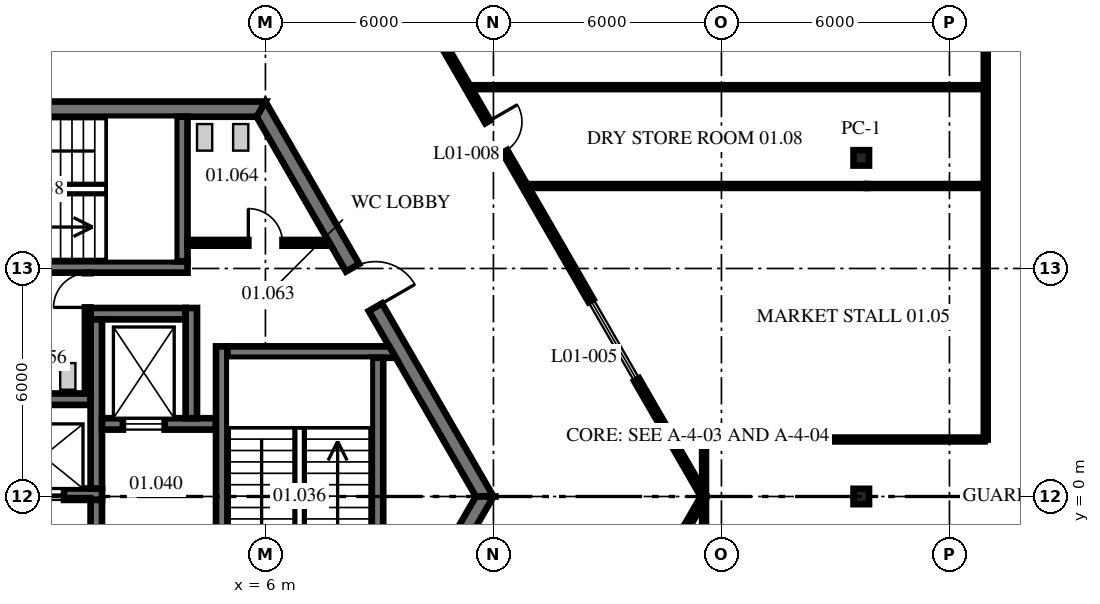
"""IFC4 building model, lengths in metres.
Left out: names, types, materials, properties, quantities, classifications, styles, units other than length and angle.
Written with IfcOpenShell. Run it as: python <this file> out.ifc"""

import sys

from ifc_helpers import new_model, si_unit, direction, frame, frame_2d, origin, origin_2d, place, context, subcontext, project, spatial, polyline, rectangle, i_section, outline, extrude, source, transform, mapped, element, fill, save


model = new_model("IFC4")
c1 = context("Model", 3, precision=1e-05, world=origin(), true_north=direction((0.0, 1.0)))
c2 = subcontext(c1, "Body", "Model", "MODEL_VIEW")
j1 = project(units=[si_unit("LENGTHUNIT", "METRE"), si_unit("PLANEANGLEUNIT", "RADIAN")], contexts=[c1])
p1 = place(None, origin())
s1 = spatial("IfcSite", under=j1, at=p1, CompositionType="ELEMENT")
p2 = place(p1, origin())
s2 = spatial("IfcBuilding", under=s1, at=p2, CompositionType="ELEMENT")
p3 = place(p2, frame((0.0, 0.0, 7.0)))
s3 = spatial("IfcBuildingStorey", under=s2, at=p3, CompositionType="ELEMENT", Elevation=7.0)
m1 = source(origin(), c2, "Body", "SweptSolid", [
    extrude(i_section(OverallWidth=0.404, OverallDepth=0.406, WebThickness=0.027, FlangeThickness=0.044, at=origin_2d()), origin(), (0.0, 0.0, 1.0), 4.5),
])
for number, where, z_axis, x_axis in (
    (1, (21.679, 0.0, 0.0), (0.0, 0.0, 1.0), (0.0, 1.0, 0.0)),
    (2, (21.679, 8.91, 0.0), (0.0, 0.0, 1.0), (0.0, 1.0, 0.0)),
):
    element("IfcColumn", number, at=place(p3, frame(where, z_axis=z_axis, x_axis=x_axis)), inside=s3, PredefinedType="COLUMN", context=c2, shape_type="MappedRepresentation", body=[
        mapped(m1, transform((0.0, 0.0, 0.0), scale=1.0)),
    ])
m2 = source(origin(), c2, "Body", "SweptSolid", [
    extrude(outline(polyline([(-0.115, -0.2), (11.885, -0.2), (11.654, 0.2), (0.115, 0.2), (-0.115, -0.2)])), origin(), (0.0, 0.0, 1.0), 4.3),
])
p4 = place(p3, frame((11.769, 0.0, 0.0), z_axis=(0.0, 0.0, 1.0), x_axis=(-0.499996592174, 0.866027371285, 0.0)))
e3 = element("IfcWall", 3, at=p4, inside=s3, PredefinedType="SHEAR", context=c2, shape_type="MappedRepresentation", body=[
    mapped(m2, transform((0.0, 0.0, 0.0), scale=1.0)),
])
p5 = place(p4, frame((5.75, 0.0, 0.0)))
e4 = element("IfcOpeningElement", 4, at=p5, cuts=e3, PredefinedType="OPENING", context=c2, shape_type="SweptSolid", body=[
    extrude(rectangle(XDim=1.2, YDim=2.1, at=frame_2d((0.6, 1.05))), frame((0.0, 0.21, 0.0), z_axis=(0.0, -1.0, 0.0), x_axis=(1.0, 0.0, 0.0)), (0.0, 0.0, 1.0), 0.42),
])
p6 = place(p3, frame((5.885, 10.192, 0.0), z_axis=(0.0, 0.0, 1.0), x_axis=(-1.0, 0.0, 0.0)))
e5 = element("IfcWall", 5, at=p6, inside=s3, PredefinedType="SHEAR", context=c2, shape_type="MappedRepresentation", body=[
    mapped(m2, transform((0.0, 0.0, 0.0), scale=1.0)),
])
p7 = place(p6, frame((7.985, 0.0, 0.0)))
e6 = element("IfcOpeningElement", 6, at=p7, cuts=e5, PredefinedType="OPENING", context=c2, shape_type="SweptSolid", body=[
    extrude(rectangle(XDim=1.2, YDim=2.1, at=frame_2d((0.6, 1.05))), frame((0.0, 0.21, 0.0), z_axis=(0.0, -1.0, 0.0), x_axis=(1.0, 0.0, 0.0)), (0.0, 0.0, 1.0), 0.42),
])
p8 = place(p3, frame((5.885, -10.192, 0.0), z_axis=(0.0, 0.0, 1.0), x_axis=(0.499996592174, 0.866027371285, 0.0)))
e7 = element("IfcWall", 7, at=p8, inside=s3, PredefinedType="SHEAR", context=c2, shape_type="MappedRepresentation", body=[
    mapped(m2, transform((0.0, 0.0, 0.0), scale=1.0)),
])
p9 = place(p8, frame((3.665, 0.0, 0.0)))
e8 = element("IfcOpeningElement", 8, at=p9, cuts=e7, PredefinedType="OPENING", context=c2, shape_type="SweptSolid", body=[
    extrude(rectangle(XDim=1.2, YDim=2.1, at=frame_2d((0.6, 1.05))), frame((0.0, 0.21, 0.0), z_axis=(0.0, -1.0, 0.0), x_axis=(1.0, 0.0, 0.0)), (0.0, 0.0, 1.0), 0.42),
])
m3 = source(origin(), c2, "Body", "SweptSolid", [
    extrude(rectangle(XDim=11.5, YDim=0.3, at=frame_2d((5.75, 0.0))), origin(), (0.0, 0.0, 1.0), 4.3),
])
p10 = place(p3, frame((-9.8, 0.06, 0.0), z_axis=(0.0, 0.0, 1.0), x_axis=(1.0, 0.0, 0.0)))
e9 = element("IfcWall", 9, at=p10, inside=s3, PredefinedType="SHEAR", context=c2, shape_type="MappedRepresentation", body=[
    mapped(m3, transform((0.0, 0.0, 0.0), scale=1.0)),
])
p11 = place(p10, frame((1.0, 0.0, 0.0)))
e10 = element("IfcOpeningElement", 10, at=p11, cuts=e9, PredefinedType="OPENING", context=c2, shape_type="SweptSolid", body=[
    extrude(rectangle(XDim=1.1, YDim=2.1, at=frame_2d((0.55, 1.05))), frame((0.0, 0.16, 0.0), z_axis=(0.0, -1.0, 0.0), x_axis=(1.0, 0.0, 0.0)), (0.0, 0.0, 1.0), 0.32),
])
p12 = place(p10, frame((3.8, 0.0, 0.0)))
e11 = element("IfcOpeningElement", 11, at=p12, cuts=e9, PredefinedType="OPENING", context=c2, shape_type="SweptSolid", body=[
    extrude(rectangle(XDim=1.1, YDim=2.1, at=frame_2d((0.55, 1.05))), frame((0.0, 0.16, 0.0), z_axis=(0.0, -1.0, 0.0), x_axis=(1.0, 0.0, 0.0)), (0.0, 0.0, 1.0), 0.32),
])
p13 = place(p10, frame((6.6, 0.0, 0.0)))
e12 = element("IfcOpeningElement", 12, at=p13, cuts=e9, PredefinedType="OPENING", context=c2, shape_type="SweptSolid", body=[
    extrude(rectangle(XDim=1.1, YDim=2.1, at=frame_2d((0.55, 1.05))), frame((0.0, 0.16, 0.0), z_axis=(0.0, -1.0, 0.0), x_axis=(1.0, 0.0, 0.0)), (0.0, 0.0, 1.0), 0.32),
])
p14 = place(p10, frame((9.4, 0.0, 0.0)))
e13 = element("IfcOpeningElement", 13, at=p14, cuts=e9, PredefinedType="OPENING", context=c2, shape_type="SweptSolid", body=[
    extrude(rectangle(XDim=1.1, YDim=2.1, at=frame_2d((0.55, 1.05))), frame((0.0, 0.16, 0.0), z_axis=(0.0, -1.0, 0.0), x_axis=(1.0, 0.0, 0.0)), (0.0, 0.0, 1.0), 0.32),
])
m4 = source(origin(), c2, "Body", "SweptSolid", [
    extrude(outline(polyline([(11.2, -0.15), (-0.349, -0.15), (-0.176, 0.15), (11.2, 0.15), (11.2, -0.15)])), origin(), (0.0, 0.0, 1.0), 4.3),
])
p15 = place(p3, frame((-9.8, 2.56, 0.0), z_axis=(0.0, 0.0, 1.0), x_axis=(1.0, 0.0, 0.0)))
e14 = element("IfcWall", 14, at=p15, inside=s3, PredefinedType="SHEAR", context=c2, shape_type="MappedRepresentation", body=[
    mapped(m4, transform((0.0, 0.0, 0.0), scale=1.0)),
])
m5 = source(origin(), c2, "Body", "SweptSolid", [
    extrude(rectangle(XDim=2.5, YDim=0.3, at=frame_2d((1.25, 0.0))), origin(), (0.0, 0.0, 1.0), 4.3),
])
p16 = place(p3, frame((1.4, 4.81, 0.0), z_axis=(0.0, 0.0, 1.0), x_axis=(1.0, 0.0, 0.0)))
e15 = element("IfcWall", 15, at=p16, inside=s3, PredefinedType="SHEAR", context=c2, shape_type="MappedRepresentation", body=[
    mapped(m5, transform((0.0, 0.0, 0.0), scale=1.0)),
])
m6 = source(origin(), c2, "Body", "SweptSolid", [
    extrude(rectangle(XDim=4.45, YDim=0.3, at=frame_2d((2.225, 0.0))), origin(), (0.0, 0.0, 1.0), 4.3),
])
p17 = place(p3, frame((1.55, 0.21, 0.0), z_axis=(0.0, 0.0, 1.0), x_axis=(0.0, 1.0, 0.0)))
e16 = element("IfcWall", 16, at=p17, inside=s3, PredefinedType="SHEAR", context=c2, shape_type="MappedRepresentation", body=[
    mapped(m6, transform((0.0, 0.0, 0.0), scale=1.0)),
])
m7 = source(origin(), c2, "Body", "SweptSolid", [
    extrude(rectangle(XDim=3.0, YDim=0.3, at=frame_2d((1.5, 0.0))), origin(), (0.0, 0.0, 1.0), 4.3),
])
p18 = place(p3, frame((1.7, 1.91, 0.0), z_axis=(0.0, 0.0, 1.0), x_axis=(1.0, 0.0, 0.0)))
e17 = element("IfcWall", 17, at=p18, inside=s3, PredefinedType="SHEAR", context=c2, shape_type="MappedRepresentation", body=[
    mapped(m7, transform((0.0, 0.0, 0.0), scale=1.0)),
])
p19 = place(p18, frame((0.55, 0.0, 0.0)))
e18 = element("IfcOpeningElement", 18, at=p19, cuts=e17, PredefinedType="OPENING", context=c2, shape_type="SweptSolid", body=[
    extrude(rectangle(XDim=1.1, YDim=2.1, at=frame_2d((0.55, 1.05))), frame((0.0, 0.16, 0.0), z_axis=(0.0, -1.0, 0.0), x_axis=(1.0, 0.0, 0.0)), (0.0, 0.0, 1.0), 0.32),
])
m8 = source(origin(), c2, "Body", "SweptSolid", [
    extrude(rectangle(XDim=2.9, YDim=0.3, at=frame_2d((1.45, 0.0))), origin(), (0.0, 0.0, 1.0), 4.3),
])
p20 = place(p3, frame((4.05, 2.06, 0.0), z_axis=(0.0, 0.0, 1.0), x_axis=(0.0, 1.0, 0.0)))
e19 = element("IfcWall", 19, at=p20, inside=s3, PredefinedType="SHEAR", context=c2, shape_type="MappedRepresentation", body=[
    mapped(m8, transform((0.0, 0.0, 0.0), scale=1.0)),
])
p21 = place(p3, frame((1.55, -3.09, 0.0), z_axis=(0.0, 0.0, 1.0), x_axis=(0.0, 1.0, 0.0)))
e20 = element("IfcWall", 20, at=p21, inside=s3, PredefinedType="SHEAR", context=c2, shape_type="MappedRepresentation", body=[
    mapped(m7, transform((0.0, 0.0, 0.0), scale=1.0)),
])
p22 = place(p21, frame((0.9, 0.0, 0.0)))
e21 = element("IfcOpeningElement", 21, at=p22, cuts=e20, PredefinedType="OPENING", context=c2, shape_type="SweptSolid", body=[
    extrude(rectangle(XDim=1.2, YDim=2.1, at=frame_2d((0.6, 1.05))), frame((0.0, 0.16, 0.0), z_axis=(0.0, -1.0, 0.0), x_axis=(1.0, 0.0, 0.0)), (0.0, 0.0, 1.0), 0.32),
])
m9 = source(origin(), c2, "Body", "SweptSolid", [
    extrude(outline(polyline([(-0.15, -0.15), (9.99, -0.15), (9.99, 0.15), (0.15, 0.15), (-0.15, -0.15)])), origin(), (0.0, 0.0, 1.0), 4.3),
])
p23 = place(p3, frame((4.85, -6.04, 0.0), z_axis=(0.0, 0.0, 1.0), x_axis=(0.0, 1.0, 0.0)))
e22 = element("IfcWall", 22, at=p23, inside=s3, PredefinedType="SHEAR", context=c2, shape_type="MappedRepresentation", body=[
    mapped(m9, transform((0.0, 0.0, 0.0), scale=1.0)),
])
p24 = place(p23, frame((3.19, 0.0, 0.0)))
e23 = element("IfcOpeningElement", 23, at=p24, cuts=e22, PredefinedType="OPENING", context=c2, shape_type="SweptSolid", body=[
    extrude(rectangle(XDim=1.1, YDim=2.1, at=frame_2d((0.55, 1.05))), frame((0.0, 0.16, 0.0), z_axis=(0.0, -1.0, 0.0), x_axis=(1.0, 0.0, 0.0)), (0.0, 0.0, 1.0), 0.32),
])
m10 = source(origin(), c2, "Body", "SweptSolid", [
    extrude(outline(polyline([(0.0, -0.15), (0.0, 0.15), (4.26, 0.15), (4.433, -0.15), (0.0, -0.15)])), origin(), (0.0, 0.0, 1.0), 4.3),
])
p25 = place(p3, frame((5.0, 3.8, 0.0), z_axis=(0.0, 0.0, 1.0), x_axis=(1.0, 0.0, 0.0)))
e24 = element("IfcWall", 24, at=p25, inside=s3, PredefinedType="SHEAR", context=c2, shape_type="MappedRepresentation", body=[
    mapped(m10, transform((0.0, 0.0, 0.0), scale=1.0)),
])
m11 = source(origin(), c2, "Body", "SweptSolid", [
    extrude(rectangle(XDim=7.3, YDim=0.3, at=frame_2d((3.65, 0.0))), origin(), (0.0, 0.0, 1.0), 4.3),
])
p26 = place(p3, frame((8.95, -3.65, 0.0), z_axis=(0.0, 0.0, 1.0), x_axis=(0.0, 1.0, 0.0)))
e25 = element("IfcWall", 25, at=p26, inside=s3, PredefinedType="SHEAR", context=c2, shape_type="MappedRepresentation", body=[
    mapped(m11, transform((0.0, 0.0, 0.0), scale=1.0)),
])
m12 = source(origin(), c2, "Body", "SweptSolid", [
    extrude(rectangle(XDim=7.9, YDim=0.3, at=frame_2d((3.95, 0.0))), origin(), (0.0, 0.0, 1.0), 4.3),
])
p27 = place(p3, frame((-3.95, 6.04, 0.0), z_axis=(0.0, 0.0, 1.0), x_axis=(1.0, 0.0, 0.0)))
e26 = element("IfcWall", 26, at=p27, inside=s3, PredefinedType="SHEAR", context=c2, shape_type="MappedRepresentation", body=[
    mapped(m12, transform((0.0, 0.0, 0.0), scale=1.0)),
])
m13 = source(origin(), c2, "Body", "SweptSolid", [
    extrude(outline(polyline([(0.0, -0.15), (0.0, 0.15), (3.804, 0.15), (3.804, -0.15), (0.0, -0.15)])), origin(), (0.0, 0.0, 1.0), 4.3),
])
p28 = place(p3, frame((3.8, 6.19, 0.0), z_axis=(0.0, 0.0, 1.0), x_axis=(0.0, 1.0, 0.0)))
e27 = element("IfcWall", 27, at=p28, inside=s3, PredefinedType="SHEAR", context=c2, shape_type="MappedRepresentation", body=[
    mapped(m13, transform((0.0, 0.0, 0.0), scale=1.0)),
])
m14 = source(origin(), c2, "Body", "SweptSolid", [
    extrude(rectangle(XDim=3.18, YDim=0.15, at=frame_2d((1.59, 0.0))), origin(), (0.0, 0.0, 1.0), 4.3),
])
p29 = place(p3, frame((1.325, 2.71, 0.0), z_axis=(0.0, 0.0, 1.0), x_axis=(0.0, 1.0, 0.0)))
e28 = element("IfcWall", 28, at=p29, inside=s3, PredefinedType="PARTITIONING", context=c2, shape_type="MappedRepresentation", body=[
    mapped(m14, transform((0.0, 0.0, 0.0), scale=1.0)),
])
p30 = place(p29, frame((2.265, 0.0, 0.0)))
e29 = element("IfcOpeningElement", 29, at=p30, cuts=e28, PredefinedType="OPENING", context=c2, shape_type="SweptSolid", body=[
    extrude(rectangle(XDim=0.9, YDim=2.1, at=frame_2d((0.45, 1.05))), frame((0.0, 0.085, 0.0), z_axis=(0.0, -1.0, 0.0), x_axis=(1.0, 0.0, 0.0)), (0.0, 0.0, 1.0), 0.17),
])
m15 = source(origin(), c2, "Body", "SweptSolid", [
    extrude(outline(polyline([(0.0, -0.075), (0.0, 0.075), (3.693, 0.075), (3.78, -0.075), (0.0, -0.075)])), origin(), (0.0, 0.0, 1.0), 4.3),
])
p31 = place(p3, frame((3.95, 6.675, 0.0), z_axis=(0.0, 0.0, 1.0), x_axis=(1.0, 0.0, 0.0)))
e30 = element("IfcWall", 30, at=p31, inside=s3, PredefinedType="PARTITIONING", context=c2, shape_type="MappedRepresentation", body=[
    mapped(m15, transform((0.0, 0.0, 0.0), scale=1.0)),
])
p32 = place(p31, frame((1.6, 0.0, 0.0)))
e31 = element("IfcOpeningElement", 31, at=p32, cuts=e30, PredefinedType="OPENING", context=c2, shape_type="SweptSolid", body=[
    extrude(rectangle(XDim=0.9, YDim=2.1, at=frame_2d((0.45, 1.05))), frame((0.0, 0.085, 0.0), z_axis=(0.0, -1.0, 0.0), x_axis=(1.0, 0.0, 0.0)), (0.0, 0.0, 1.0), 0.17),
])
p33 = place(p3, frame((8.792, 15.156, 0.0), z_axis=(0.0, 0.0, 1.0), x_axis=(0.499996830835, -0.866027233495, 0.0)))
e32 = element("IfcWall", 32, at=p33, inside=s3, PredefinedType="PARTITIONING", context=c2, shape_type="SweptSolid", body=[
    extrude(rectangle(XDim=17.458, YDim=0.15, at=frame_2d((8.729, 0.0))), origin(), (0.0, 0.0, 1.0), 4.3),
])
p34 = place(p33, frame((11.551, 0.0, 0.0)))
e33 = element("IfcOpeningElement", 33, at=p34, cuts=e32, PredefinedType="OPENING", context=c2, shape_type="SweptSolid", body=[
    extrude(rectangle(XDim=2.4, YDim=2.4, at=frame_2d((1.2, 1.2))), frame((0.0, 0.085, 0.0), z_axis=(0.0, -1.0, 0.0), x_axis=(1.0, 0.0, 0.0)), (0.0, 0.0, 1.0), 0.17),
])
p35 = place(p33, frame((2.014, 0.0, 0.0)))
e34 = element("IfcOpeningElement", 34, at=p35, cuts=e32, PredefinedType="OPENING", context=c2, shape_type="SweptSolid", body=[
    extrude(rectangle(XDim=0.9, YDim=2.1, at=frame_2d((0.45, 1.05))), frame((0.0, 0.085, 0.0), z_axis=(0.0, -1.0, 0.0), x_axis=(1.0, 0.0, 0.0)), (0.0, 0.0, 1.0), 0.17),
])
p36 = place(p33, frame((6.117, 0.0, 0.0)))
e35 = element("IfcOpeningElement", 35, at=p36, cuts=e32, PredefinedType="OPENING", context=c2, shape_type="SweptSolid", body=[
    extrude(rectangle(XDim=0.9, YDim=2.1, at=frame_2d((0.45, 1.05))), frame((0.0, 0.085, 0.0), z_axis=(0.0, -1.0, 0.0), x_axis=(1.0, 0.0, 0.0)), (0.0, 0.0, 1.0), 0.17),
])
p37 = place(p3, frame((17.542, 1.5, 0.0), z_axis=(0.0, 0.0, 1.0), x_axis=(1.0, 0.0, 0.0)))
e36 = element("IfcWall", 36, at=p37, inside=s3, PredefinedType="PARTITIONING", context=c2, shape_type="SweptSolid", body=[
    extrude(rectangle(XDim=7.382, YDim=0.1, at=frame_2d((3.691, 0.0))), origin(), (0.0, 0.0, 1.0), 4.3),
])
m16 = source(origin(), c2, "Body", "SweptSolid", [
    extrude(rectangle(XDim=8.919, YDim=0.1, at=frame_2d((4.459, 0.0))), origin(), (0.0, 0.0, 1.0), 4.3),
])
p38 = place(p3, frame((12.916, 8.17, 0.0), z_axis=(0.0, 0.0, 1.0), x_axis=(1.0, 0.0, 0.0)))
e37 = element("IfcWall", 37, at=p38, inside=s3, PredefinedType="PARTITIONING", context=c2, shape_type="MappedRepresentation", body=[
    mapped(m16, transform((0.0, 0.0, 0.0), scale=1.0)),
])
p39 = place(p3, frame((21.834, 8.17, 0.0), z_axis=(0.0, 0.0, 1.0), x_axis=(1.0, 0.0, 0.0)))
e38 = element("IfcWall", 38, at=p39, inside=s3, PredefinedType="PARTITIONING", context=c2, shape_type="SweptSolid", body=[
    extrude(rectangle(XDim=3.09, YDim=0.1, at=frame_2d((1.545, 0.0))), origin(), (0.0, 0.0, 1.0), 3.528),
])
p40 = place(p3, frame((11.415, 10.77, 0.0), z_axis=(0.0, 0.0, 1.0), x_axis=(1.0, 0.0, 0.0)))
e39 = element("IfcWall", 39, at=p40, inside=s3, PredefinedType="PARTITIONING", context=c2, shape_type="SweptSolid", body=[
    extrude(rectangle(XDim=13.51, YDim=0.1, at=frame_2d((6.755, 0.0))), origin(), (0.0, 0.0, 1.0), 4.3),
])
p41 = place(p3, frame((8.772, -15.191, 0.0), z_axis=(0.0, 0.0, 1.0), x_axis=(0.499997184852, 0.866027029105, 0.0)))
e40 = element("IfcWall", 40, at=p41, inside=s3, PredefinedType="PARTITIONING", context=c2, shape_type="SweptSolid", body=[
    extrude(rectangle(XDim=17.539, YDim=0.15, at=frame_2d((8.769, 0.0))), origin(), (0.0, 0.0, 1.0), 4.3),
])
p42 = place(p41, frame((11.657, 0.0, 0.0)))
e41 = element("IfcOpeningElement", 41, at=p42, cuts=e40, PredefinedType="OPENING", context=c2, shape_type="SweptSolid", body=[
    extrude(rectangle(XDim=2.4, YDim=2.4, at=frame_2d((1.2, 1.2))), frame((0.0, 0.085, 0.0), z_axis=(0.0, -1.0, 0.0), x_axis=(1.0, 0.0, 0.0)), (0.0, 0.0, 1.0), 0.17),
])
p43 = place(p3, frame((24.954, 1.5, 0.0), z_axis=(0.0, 0.0, 1.0), x_axis=(0.0, 1.0, 0.0)))
e42 = element("IfcWall", 42, at=p43, inside=s3, PredefinedType="PARTITIONING", context=c2, shape_type="SweptSolid", body=[
    extrude(rectangle(XDim=24.6, YDim=0.1, at=frame_2d((12.3, 0.0))), origin(), (0.0, 0.0, 1.0), 4.3),
])
p44 = place(p3, frame((17.542, -1.47, 0.0), z_axis=(0.0, 0.0, 1.0), x_axis=(0.0, 1.0, 0.0)))
e43 = element("IfcWall", 43, at=p44, inside=s3, PredefinedType="PARTITIONING", context=c2, shape_type="SweptSolid", body=[
    extrude(rectangle(XDim=2.94, YDim=0.1, at=frame_2d((1.47, 0.0))), origin(), (0.0, 0.0, 1.0), 4.3),
])
p45 = place(p5, frame((1.2, 0.0, 0.0), z_axis=(0.0, 0.0, 1.0), x_axis=(-1.0, 0.0, 0.0)))
e44 = element("IfcDoor", 44, at=p45, inside=s3, OperationType="SINGLE_SWING_RIGHT", PredefinedType="DOOR", context=c2, shape_type="SweptSolid", body=[
    extrude(rectangle(XDim=1.2, YDim=2.1, at=frame_2d((0.6, 1.05))), frame((0.0, 0.025, 0.0), z_axis=(0.0, -1.0, 0.0), x_axis=(1.0, 0.0, 0.0)), (0.0, 0.0, 1.0), 0.05),
])
fill(e4, e44)
p46 = place(p30, origin())
e45 = element("IfcDoor", 45, at=p46, inside=s3, OperationType="SINGLE_SWING_LEFT", PredefinedType="DOOR", context=c2, shape_type="SweptSolid", body=[
    extrude(rectangle(XDim=0.9, YDim=2.1, at=frame_2d((0.45, 1.05))), frame((0.0, 0.025, 0.0), z_axis=(0.0, -1.0, 0.0), x_axis=(1.0, 0.0, 0.0)), (0.0, 0.0, 1.0), 0.05),
])
fill(e29, e45)
p47 = place(p32, origin())
e46 = element("IfcDoor", 46, at=p47, inside=s3, OperationType="SINGLE_SWING_LEFT", PredefinedType="DOOR", context=c2, shape_type="SweptSolid", body=[
    extrude(rectangle(XDim=0.9, YDim=2.1, at=frame_2d((0.45, 1.05))), frame((0.0, 0.025, 0.0), z_axis=(0.0, -1.0, 0.0), x_axis=(1.0, 0.0, 0.0)), (0.0, 0.0, 1.0), 0.05),
])
fill(e31, e46)
p48 = place(p14, origin())
e47 = element("IfcDoor", 47, at=p48, inside=s3, OperationType="DOUBLE_DOOR_SLIDING", PredefinedType="DOOR", context=c2, shape_type="SweptSolid", body=[
    extrude(rectangle(XDim=1.1, YDim=2.1, at=frame_2d((0.55, 1.05))), frame((0.0, 0.025, 0.0), z_axis=(0.0, -1.0, 0.0), x_axis=(1.0, 0.0, 0.0)), (0.0, 0.0, 1.0), 0.05),
])
fill(e13, e47)
p49 = place(p19, origin())
e48 = element("IfcDoor", 48, at=p49, inside=s3, OperationType="DOUBLE_DOOR_SLIDING", PredefinedType="DOOR", context=c2, shape_type="SweptSolid", body=[
    extrude(rectangle(XDim=1.1, YDim=2.1, at=frame_2d((0.55, 1.05))), frame((0.0, 0.025, 0.0), z_axis=(0.0, -1.0, 0.0), x_axis=(1.0, 0.0, 0.0)), (0.0, 0.0, 1.0), 0.05),
])
fill(e18, e48)
p50 = place(p34, origin())
e49 = element("IfcDoor", 49, at=p50, inside=s3, OperationType="ROLLINGUP", PredefinedType="DOOR", context=c2, shape_type="SweptSolid", body=[
    extrude(rectangle(XDim=2.4, YDim=2.4, at=frame_2d((1.2, 1.2))), frame((0.0, 0.025, 0.0), z_axis=(0.0, -1.0, 0.0), x_axis=(1.0, 0.0, 0.0)), (0.0, 0.0, 1.0), 0.05),
])
fill(e33, e49)
p51 = place(p36, origin())
e50 = element("IfcDoor", 50, at=p51, inside=s3, OperationType="SINGLE_SWING_LEFT", PredefinedType="DOOR", context=c2, shape_type="SweptSolid", body=[
    extrude(rectangle(XDim=0.9, YDim=2.1, at=frame_2d((0.45, 1.05))), frame((0.0, 0.025, 0.0), z_axis=(0.0, -1.0, 0.0), x_axis=(1.0, 0.0, 0.0)), (0.0, 0.0, 1.0), 0.05),
])
fill(e35, e50)
save(model, sys.argv[1])
